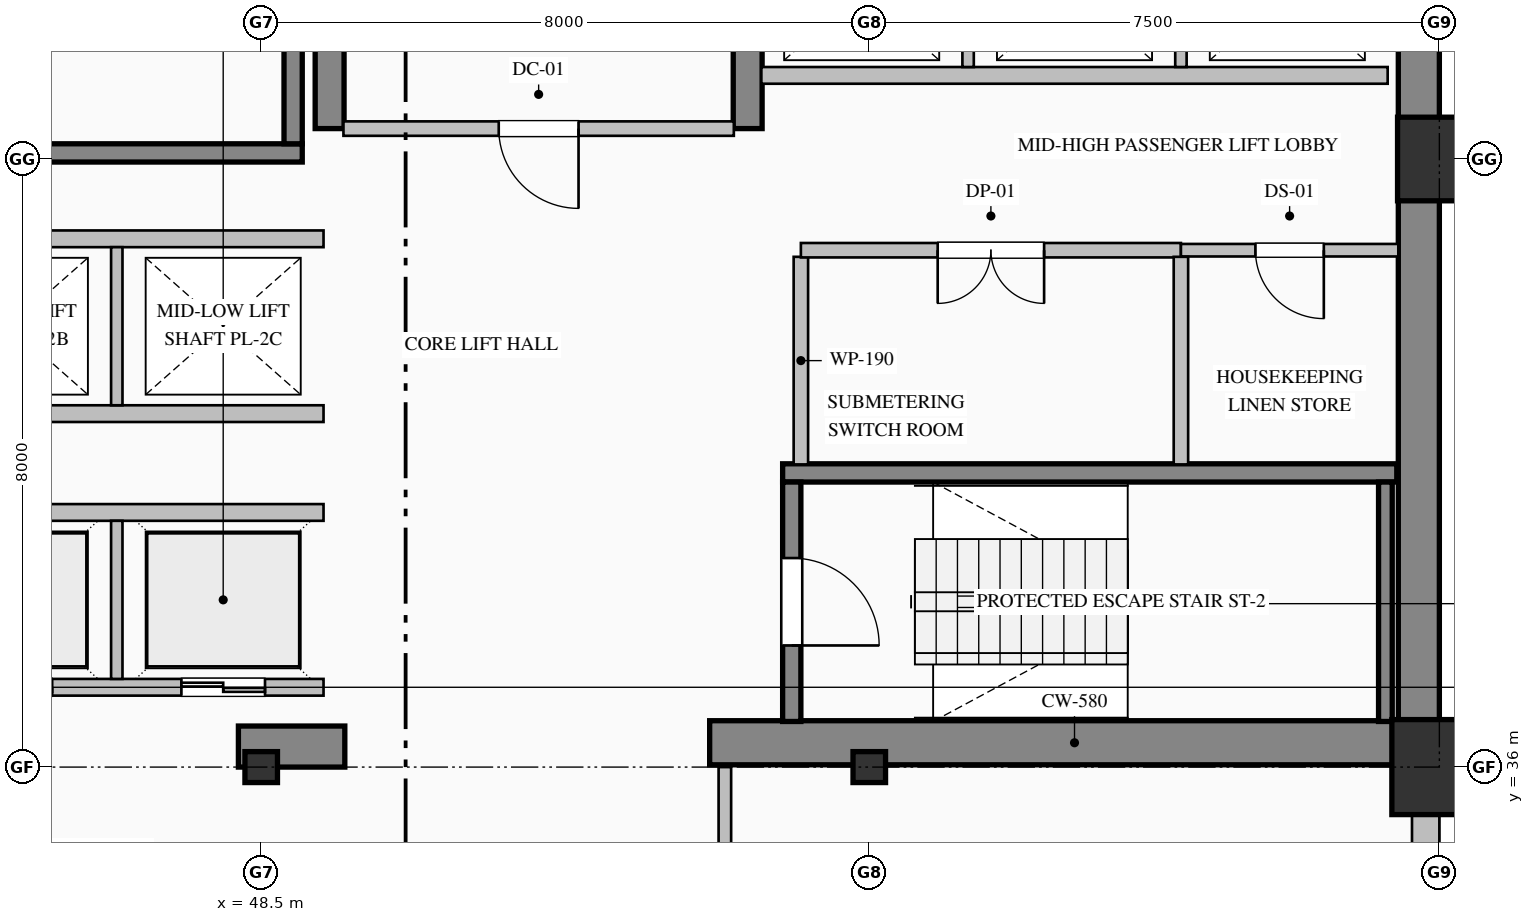
"""IFC4 building model, lengths in metres.
Left out: names, types, materials, properties, quantities, classifications, styles, units other than length and angle.
Written with IfcOpenShell. Run it as: python <this file> out.ifc"""

import sys

from ifc_helpers import new_model, si_unit, direction, frame, frame_2d, origin, origin_2d, place, context, subcontext, project, spatial, rectangle, hollow_rectangle, i_section, extrude, element, fill, save


model = new_model("IFC4")
c1 = context("Model", 3, precision=1e-05, world=origin(), true_north=direction((0.0, 1.0)))
c2 = subcontext(c1, "Body", "Model", "MODEL_VIEW")
j1 = project(units=[si_unit("LENGTHUNIT", "METRE"), si_unit("PLANEANGLEUNIT", "RADIAN")], contexts=[c1])
p1 = place(None, origin())
s1 = spatial("IfcSite", under=j1, at=p1, CompositionType="ELEMENT")
p2 = place(p1, origin())
s2 = spatial("IfcBuilding", under=s1, at=p2, CompositionType="ELEMENT")
p3 = place(p2, frame((0.0, 0.0, 96.2)))
s3 = spatial("IfcBuildingStorey", under=s2, at=p3, CompositionType="ELEMENT", Elevation=96.2)
p4 = place(p3, frame((63.73, 36.32, 0.0), z_axis=(0.0, 0.0, 1.0), x_axis=(0.0, 1.0, 0.0)))
e1 = element("IfcWall", 1, at=p4, inside=s3, PredefinedType="SHEAR", context=c2, shape_type="SweptSolid", body=[
    extrude(rectangle(XDim=15.14, YDim=0.54, at=frame_2d((7.57, 0.0))), origin(), (0.0, 0.0, 1.0), 3.75),
])
p5 = place(p3, frame((48.2, 36.27, 0.0), z_axis=(0.0, 0.0, 1.0), x_axis=(1.0, 0.0, 0.0)))
e2 = element("IfcWall", 2, at=p5, inside=s3, PredefinedType="SHEAR", context=c2, shape_type="SweptSolid", body=[
    extrude(rectangle(XDim=1.4, YDim=0.54, at=frame_2d((0.7, 0.0))), origin(), (0.0, 0.0, 1.0), 3.75),
])
p6 = place(p3, frame((54.4, 36.32, 0.0), z_axis=(0.0, 0.0, 1.0), x_axis=(1.0, 0.0, 0.0)))
e3 = element("IfcWall", 3, at=p6, inside=s3, PredefinedType="SHEAR", context=c2, shape_type="SweptSolid", body=[
    extrude(rectangle(XDim=9.6, YDim=0.58, at=frame_2d((4.8, 0.0))), origin(), (0.0, 0.0, 1.0), 4.0),
])
p7 = place(p3, frame((49.4, 44.4, 0.0), z_axis=(0.0, 0.0, 1.0), x_axis=(0.0, 1.0, 0.0)))
e4 = element("IfcWall", 4, at=p7, inside=s3, PredefinedType="SHEAR", context=c2, shape_type="SweptSolid", body=[
    extrude(rectangle(XDim=3.0, YDim=0.38, at=frame_2d((1.5, 0.0))), origin(), (0.0, 0.0, 1.0), 3.75),
])
p8 = place(p3, frame((54.9, 44.4, 0.0), z_axis=(0.0, 0.0, 1.0), x_axis=(0.0, 1.0, 0.0)))
e5 = element("IfcWall", 5, at=p8, inside=s3, PredefinedType="SHEAR", context=c2, shape_type="SweptSolid", body=[
    extrude(rectangle(XDim=7.06, YDim=0.38, at=frame_2d((3.53, 0.0))), origin(), (0.0, 0.0, 1.0), 3.75),
])
for number, where, z_axis, x_axis in (
    (6, (48.5, 36.0, 0.0), (0.0, 0.0, 1.0), (1.0, 0.0, 0.0)),
    (7, (56.5, 36.0, 0.0), (0.0, 0.0, 1.0), (1.0, 0.0, 0.0)),
):
    element("IfcColumn", number, at=place(p3, frame(where, z_axis=z_axis, x_axis=x_axis)), inside=s3, PredefinedType="COLUMN", context=c2, shape_type="SweptSolid", body=[
        extrude(i_section(OverallWidth=0.407, OverallDepth=0.428, WebThickness=0.02, FlangeThickness=0.035, FilletRadius=0.022, at=origin_2d()), origin(), (0.0, 0.0, 1.0), 4.0),
    ])
p9 = place(p3, frame((64.0, 36.0, 0.0), z_axis=(0.0, 0.0, 1.0), x_axis=(1.0, 0.0, 0.0)))
e8 = element("IfcColumn", 8, at=p9, inside=s3, PredefinedType="COLUMN", context=c2, shape_type="SweptSolid", body=[
    extrude(hollow_rectangle(XDim=1.25, YDim=1.25, WallThickness=0.045, at=origin_2d()), origin(), (0.0, 0.0, 1.0), 4.0),
])
p10 = place(p3, frame((64.0, 44.0, 0.0), z_axis=(0.0, 0.0, 1.0), x_axis=(1.0, 0.0, 0.0)))
e9 = element("IfcColumn", 9, at=p10, inside=s3, PredefinedType="COLUMN", context=c2, shape_type="SweptSolid", body=[
    extrude(hollow_rectangle(XDim=1.1, YDim=1.1, WallThickness=0.04, at=origin_2d()), origin(), (0.0, 0.0, 1.0), 4.0),
])
p11 = place(p3, frame((63.82, 36.05, 0.0), z_axis=(0.0, 0.0, 1.0), x_axis=(0.0, -1.0, 0.0)))
e10 = element("IfcWall", 10, at=p11, inside=s3, PredefinedType="SOLIDWALL", context=c2, shape_type="SweptSolid", body=[
    extrude(rectangle(XDim=28.05, YDim=0.36, at=frame_2d((14.025, 0.0))), origin(), (0.0, 0.0, 1.0), 3.25),
])
p12 = place(p11, frame((2.4, 0.0, 0.8)))
e11 = element("IfcOpeningElement", 11, at=p12, cuts=e10, PredefinedType="OPENING", context=c2, shape_type="SweptSolid", body=[
    extrude(rectangle(XDim=2.4, YDim=2.15, at=frame_2d((1.2, 1.075))), frame((0.0, 0.19, 0.0), z_axis=(0.0, -1.0, 0.0), x_axis=(1.0, 0.0, 0.0)), (0.0, 0.0, 1.0), 0.38),
])
p13 = place(p11, frame((13.2, 0.0, 0.8)))
e12 = element("IfcOpeningElement", 12, at=p13, cuts=e10, PredefinedType="OPENING", context=c2, shape_type="SweptSolid", body=[
    extrude(rectangle(XDim=2.4, YDim=2.15, at=frame_2d((1.2, 1.075))), frame((0.0, 0.19, 0.0), z_axis=(0.0, -1.0, 0.0), x_axis=(1.0, 0.0, 0.0)), (0.0, 0.0, 1.0), 0.38),
])
p14 = place(p3, frame((49.04, 44.08, 0.0), z_axis=(0.0, 0.0, 1.0), x_axis=(-1.0, 0.0, 0.0)))
e13 = element("IfcWall", 13, at=p14, inside=s3, PredefinedType="SOLIDWALL", context=c2, shape_type="SweptSolid", body=[
    extrude(rectangle(XDim=8.08, YDim=0.24, at=frame_2d((4.04, 0.0))), origin(), (0.0, 0.0, 1.0), 4.0),
])
p15 = place(p3, frame((48.92, 44.2, 0.0), z_axis=(0.0, 0.0, 1.0), x_axis=(0.0, 1.0, 0.0)))
e14 = element("IfcWall", 14, at=p15, inside=s3, PredefinedType="SOLIDWALL", context=c2, shape_type="SweptSolid", body=[
    extrude(rectangle(XDim=3.15, YDim=0.24, at=frame_2d((1.575, 0.0))), origin(), (0.0, 0.0, 1.0), 4.0),
])
p16 = place(p3, frame((55.36, 39.87, 0.0), z_axis=(0.0, 0.0, 1.0), x_axis=(1.0, 0.0, 0.0)))
e15 = element("IfcWall", 15, at=p16, inside=s3, PredefinedType="SOLIDWALL", context=c2, shape_type="SweptSolid", body=[
    extrude(rectangle(XDim=8.08, YDim=0.24, at=frame_2d((4.04, 0.0))), origin(), (0.0, 0.0, 1.0), 4.0),
])
p17 = place(p3, frame((55.48, 39.75, 0.0), z_axis=(0.0, 0.0, 1.0), x_axis=(0.0, -1.0, 0.0)))
e16 = element("IfcWall", 16, at=p17, inside=s3, PredefinedType="SOLIDWALL", context=c2, shape_type="SweptSolid", body=[
    extrude(rectangle(XDim=3.15, YDim=0.24, at=frame_2d((1.575, 0.0))), origin(), (0.0, 0.0, 1.0), 4.0),
])
p18 = place(p17, frame((1.0, 0.0, 0.0)))
e17 = element("IfcOpeningElement", 17, at=p18, cuts=e16, PredefinedType="OPENING", context=c2, shape_type="SweptSolid", body=[
    extrude(rectangle(XDim=1.15, YDim=2.2, at=frame_2d((0.575, 1.1))), frame((0.0, 0.13, 0.0), z_axis=(0.0, -1.0, 0.0), x_axis=(1.0, 0.0, 0.0)), (0.0, 0.0, 1.0), 0.26),
])
p19 = place(p3, frame((63.29, 36.6, 0.0), z_axis=(0.0, 0.0, 1.0), x_axis=(0.0, 1.0, 0.0)))
e18 = element("IfcWall", 18, at=p19, inside=s3, PredefinedType="SOLIDWALL", context=c2, shape_type="SweptSolid", body=[
    extrude(rectangle(XDim=3.15, YDim=0.18, at=frame_2d((1.575, 0.0))), origin(), (0.0, 0.0, 1.0), 4.0),
])
p20 = place(p3, frame((49.32, 37.05, 0.0), z_axis=(0.0, 0.0, 1.0), x_axis=(-1.0, 0.0, 0.0)))
e19 = element("IfcWall", 19, at=p20, inside=s3, PredefinedType="PARTITIONING", context=c2, shape_type="SweptSolid", body=[
    extrude(rectangle(XDim=8.24, YDim=0.22, at=frame_2d((4.12, 0.0))), origin(), (0.0, 0.0, 1.0), 3.75),
])
p21 = place(p20, frame((6.37, 0.0, 0.0)))
e20 = element("IfcOpeningElement", 20, at=p21, cuts=e19, PredefinedType="OPENING", context=c2, shape_type="SweptSolid", body=[
    extrude(rectangle(XDim=1.1, YDim=2.2, at=frame_2d((0.55, 1.1))), frame((0.0, 0.12, 0.0), z_axis=(0.0, -1.0, 0.0), x_axis=(1.0, 0.0, 0.0)), (0.0, 0.0, 1.0), 0.24),
])
p22 = place(p20, frame((3.57, 0.0, 0.0)))
e21 = element("IfcOpeningElement", 21, at=p22, cuts=e19, PredefinedType="OPENING", context=c2, shape_type="SweptSolid", body=[
    extrude(rectangle(XDim=1.1, YDim=2.2, at=frame_2d((0.55, 1.1))), frame((0.0, 0.12, 0.0), z_axis=(0.0, -1.0, 0.0), x_axis=(1.0, 0.0, 0.0)), (0.0, 0.0, 1.0), 0.24),
])
p23 = place(p20, frame((0.77, 0.0, 0.0)))
e22 = element("IfcOpeningElement", 22, at=p23, cuts=e19, PredefinedType="OPENING", context=c2, shape_type="SweptSolid", body=[
    extrude(rectangle(XDim=1.1, YDim=2.2, at=frame_2d((0.55, 1.1))), frame((0.0, 0.12, 0.0), z_axis=(0.0, -1.0, 0.0), x_axis=(1.0, 0.0, 0.0)), (0.0, 0.0, 1.0), 0.24),
])
p24 = place(p3, frame((41.08, 39.35, 0.0), z_axis=(0.0, 0.0, 1.0), x_axis=(1.0, 0.0, 0.0)))
e23 = element("IfcWall", 23, at=p24, inside=s3, PredefinedType="PARTITIONING", context=c2, shape_type="SweptSolid", body=[
    extrude(rectangle(XDim=8.24, YDim=0.22, at=frame_2d((4.12, 0.0))), origin(), (0.0, 0.0, 1.0), 3.75),
])
p25 = place(p3, frame((46.6, 37.16, 0.0), z_axis=(0.0, 0.0, 1.0), x_axis=(0.0, 1.0, 0.0)))
e24 = element("IfcWall", 24, at=p25, inside=s3, PredefinedType="PARTITIONING", context=c2, shape_type="SweptSolid", body=[
    extrude(rectangle(XDim=2.08, YDim=0.15, at=frame_2d((1.04, 0.0))), origin(), (0.0, 0.0, 1.0), 3.75),
])
for number, where, z_axis, x_axis in (
    (25, (49.32, 40.65, 0.0), (0.0, 0.0, 1.0), (-1.0, 0.0, 0.0)),
    (26, (41.08, 42.95, 0.0), (0.0, 0.0, 1.0), (1.0, 0.0, 0.0)),
):
    element("IfcWall", number, at=place(p3, frame(where, z_axis=z_axis, x_axis=x_axis)), inside=s3, PredefinedType="PARTITIONING", context=c2, shape_type="SweptSolid", body=[
        extrude(rectangle(XDim=8.24, YDim=0.22, at=frame_2d((4.12, 0.0))), origin(), (0.0, 0.0, 1.0), 3.75),
    ])
p26 = place(p3, frame((46.6, 40.76, 0.0), z_axis=(0.0, 0.0, 1.0), x_axis=(0.0, 1.0, 0.0)))
e27 = element("IfcWall", 27, at=p26, inside=s3, PredefinedType="PARTITIONING", context=c2, shape_type="SweptSolid", body=[
    extrude(rectangle(XDim=2.08, YDim=0.15, at=frame_2d((1.04, 0.0))), origin(), (0.0, 0.0, 1.0), 3.75),
])
p27 = place(p3, frame((63.32, 45.1, 0.0), z_axis=(0.0, 0.0, 1.0), x_axis=(-1.0, 0.0, 0.0)))
e28 = element("IfcWall", 28, at=p27, inside=s3, PredefinedType="PARTITIONING", context=c2, shape_type="SweptSolid", body=[
    extrude(rectangle(XDim=8.24, YDim=0.22, at=frame_2d((4.12, 0.0))), origin(), (0.0, 0.0, 1.0), 3.75),
])
for number, where, z_axis, x_axis in (
    (29, (57.8, 45.21, 0.0), (0.0, 0.0, 1.0), (0.0, 1.0, 0.0)),
    (30, (60.6, 45.21, 0.0), (0.0, 0.0, 1.0), (0.0, 1.0, 0.0)),
):
    element("IfcWall", number, at=place(p3, frame(where, z_axis=z_axis, x_axis=x_axis)), inside=s3, PredefinedType="PARTITIONING", context=c2, shape_type="SweptSolid", body=[
        extrude(rectangle(XDim=2.03, YDim=0.15, at=frame_2d((1.015, 0.0))), origin(), (0.0, 0.0, 1.0), 3.75),
    ])
p28 = place(p3, frame((54.718, 44.4, 0.0), z_axis=(0.0, 0.0, 1.0), x_axis=(-1.0, 0.0, 0.0)))
e31 = element("IfcWall", 31, at=p28, inside=s3, PredefinedType="PARTITIONING", context=c2, shape_type="SweptSolid", body=[
    extrude(rectangle(XDim=5.136, YDim=0.19, at=frame_2d((2.568, 0.0))), origin(), (0.0, 0.0, 1.0), 3.75),
])
p29 = place(p28, frame((2.043, 0.0, 0.0)))
e32 = element("IfcOpeningElement", 32, at=p29, cuts=e31, PredefinedType="OPENING", context=c2, shape_type="SweptSolid", body=[
    extrude(rectangle(XDim=1.05, YDim=2.15, at=frame_2d((0.525, 1.075))), frame((0.0, 0.105, 0.0), z_axis=(0.0, -1.0, 0.0), x_axis=(1.0, 0.0, 0.0)), (0.0, 0.0, 1.0), 0.21),
])
p30 = place(p3, frame((55.6, 42.713, 0.0), z_axis=(0.0, 0.0, 1.0), x_axis=(0.0, -1.0, 0.0)))
e33 = element("IfcWall", 33, at=p30, inside=s3, PredefinedType="PARTITIONING", context=c2, shape_type="SweptSolid", body=[
    extrude(rectangle(XDim=2.731, YDim=0.19, at=frame_2d((1.365, 0.0))), origin(), (0.0, 0.0, 1.0), 3.75),
])
p31 = place(p3, frame((60.6, 42.8, 0.0), z_axis=(0.0, 0.0, 1.0), x_axis=(-1.0, 0.0, 0.0)))
e34 = element("IfcWall", 34, at=p31, inside=s3, PredefinedType="PARTITIONING", context=c2, shape_type="SweptSolid", body=[
    extrude(rectangle(XDim=5.0, YDim=0.19, at=frame_2d((2.5, 0.0))), origin(), (0.0, 0.0, 1.0), 3.75),
])
p32 = place(p31, frame((1.8, 0.0, 0.0)))
e35 = element("IfcOpeningElement", 35, at=p32, cuts=e34, PredefinedType="OPENING", context=c2, shape_type="SweptSolid", body=[
    extrude(rectangle(XDim=1.4, YDim=2.25, at=frame_2d((0.7, 1.125))), frame((0.0, 0.105, 0.0), z_axis=(0.0, -1.0, 0.0), x_axis=(1.0, 0.0, 0.0)), (0.0, 0.0, 1.0), 0.21),
])
p33 = place(p3, frame((63.46, 42.8, 0.0), z_axis=(0.0, 0.0, 1.0), x_axis=(-1.0, 0.0, 0.0)))
e36 = element("IfcWall", 36, at=p33, inside=s3, PredefinedType="PARTITIONING", context=c2, shape_type="SweptSolid", body=[
    extrude(rectangle(XDim=2.86, YDim=0.165, at=frame_2d((1.43, 0.0))), origin(), (0.0, 0.0, 1.0), 3.75),
])
p34 = place(p33, frame((0.98, 0.0, 0.0)))
e37 = element("IfcOpeningElement", 37, at=p34, cuts=e36, PredefinedType="OPENING", context=c2, shape_type="SweptSolid", body=[
    extrude(rectangle(XDim=0.9, YDim=2.15, at=frame_2d((0.45, 1.075))), frame((0.0, 0.093, 0.0), z_axis=(0.0, -1.0, 0.0), x_axis=(1.0, 0.0, 0.0)), (0.0, 0.0, 1.0), 0.185),
])
p35 = place(p3, frame((60.6, 42.713, 0.0), z_axis=(0.0, 0.0, 1.0), x_axis=(0.0, -1.0, 0.0)))
e38 = element("IfcWall", 38, at=p35, inside=s3, PredefinedType="PARTITIONING", context=c2, shape_type="SweptSolid", body=[
    extrude(rectangle(XDim=2.731, YDim=0.19, at=frame_2d((1.365, 0.0))), origin(), (0.0, 0.0, 1.0), 3.75),
])
p36 = place(p3, frame((54.6, 36.0, 0.0), z_axis=(0.0, 0.0, 1.0), x_axis=(0.0, -1.0, 0.0)))
e39 = element("IfcWall", 39, at=p36, inside=s3, PredefinedType="PARTITIONING", context=c2, shape_type="SweptSolid", body=[
    extrude(rectangle(XDim=2.125, YDim=0.165, at=frame_2d((1.063, 0.0))), origin(), (0.0, 0.0, 1.0), 3.75),
])
p37 = place(p18, origin())
e40 = element("IfcDoor", 40, at=p37, inside=s3, OperationType="SINGLE_SWING_RIGHT", PredefinedType="DOOR", context=c2, shape_type="SweptSolid", body=[
    extrude(rectangle(XDim=1.15, YDim=2.2, at=frame_2d((0.575, 1.1))), frame((0.0, 0.025, 0.0), z_axis=(0.0, -1.0, 0.0), x_axis=(1.0, 0.0, 0.0)), (0.0, 0.0, 1.0), 0.05),
])
fill(e17, e40)
p38 = place(p23, origin())
e41 = element("IfcDoor", 41, at=p38, inside=s3, OperationType="DOUBLE_DOOR_SLIDING", PredefinedType="DOOR", context=c2, shape_type="SweptSolid", body=[
    extrude(rectangle(XDim=1.1, YDim=2.2, at=frame_2d((0.55, 1.1))), frame((0.0, 0.025, 0.0), z_axis=(0.0, -1.0, 0.0), x_axis=(1.0, 0.0, 0.0)), (0.0, 0.0, 1.0), 0.05),
])
fill(e22, e41)
p39 = place(p29, origin())
e42 = element("IfcDoor", 42, at=p39, inside=s3, OperationType="SINGLE_SWING_LEFT", PredefinedType="DOOR", context=c2, shape_type="SweptSolid", body=[
    extrude(rectangle(XDim=1.05, YDim=2.15, at=frame_2d((0.525, 1.075))), frame((0.0, 0.025, 0.0), z_axis=(0.0, -1.0, 0.0), x_axis=(1.0, 0.0, 0.0)), (0.0, 0.0, 1.0), 0.05),
])
fill(e32, e42)
p40 = place(p32, origin())
e43 = element("IfcDoor", 43, at=p40, inside=s3, OperationType="DOUBLE_DOOR_SINGLE_SWING", PredefinedType="DOOR", context=c2, shape_type="SweptSolid", body=[
    extrude(rectangle(XDim=1.4, YDim=2.25, at=frame_2d((0.7, 1.125))), frame((0.0, 0.025, 0.0), z_axis=(0.0, -1.0, 0.0), x_axis=(1.0, 0.0, 0.0)), (0.0, 0.0, 1.0), 0.05),
])
fill(e35, e43)
p41 = place(p34, origin())
e44 = element("IfcDoor", 44, at=p41, inside=s3, OperationType="SINGLE_SWING_LEFT", PredefinedType="DOOR", context=c2, shape_type="SweptSolid", body=[
    extrude(rectangle(XDim=0.9, YDim=2.15, at=frame_2d((0.45, 1.075))), frame((0.0, 0.025, 0.0), z_axis=(0.0, -1.0, 0.0), x_axis=(1.0, 0.0, 0.0)), (0.0, 0.0, 1.0), 0.05),
])
fill(e37, e44)
save(model, sys.argv[1])
